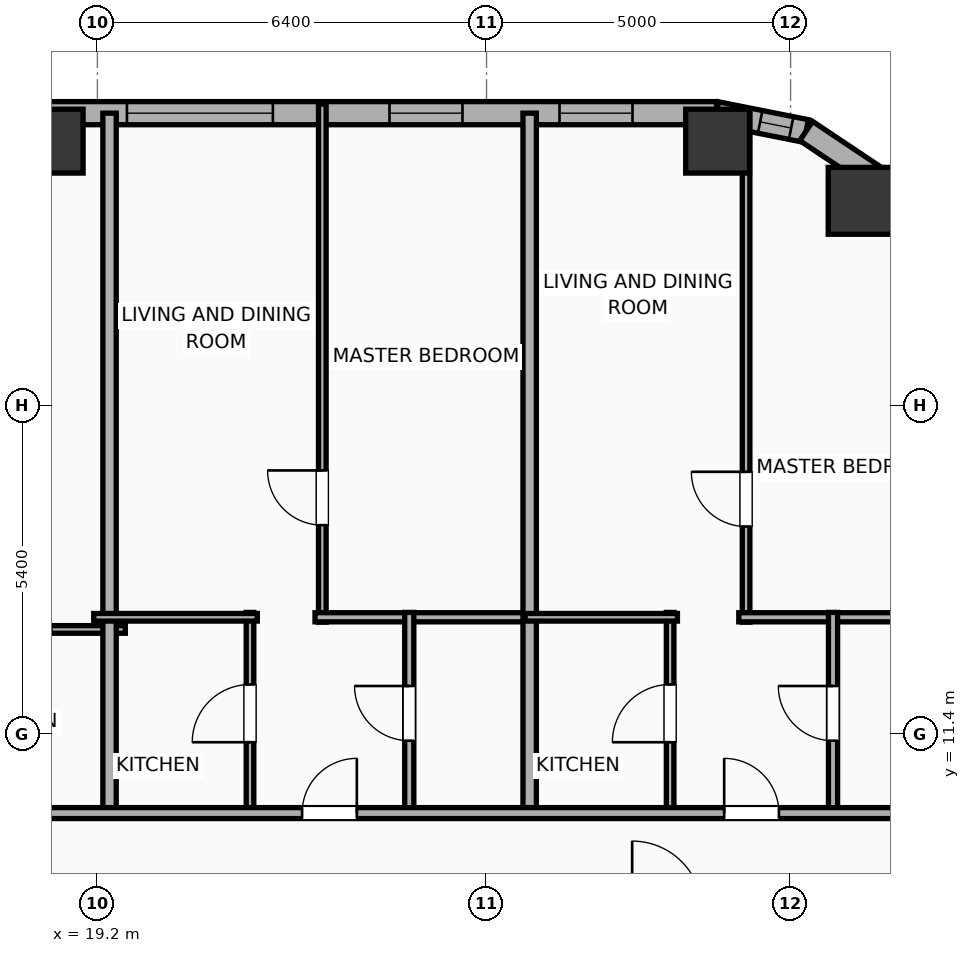
"""IFC4 building model, lengths in metres.
Left out: names, types, materials, properties, quantities, classifications, styles, units other than length and angle.
Written with IfcOpenShell. Run it as: python <this file> out.ifc"""

import sys

from ifc_helpers import new_model, si_unit, direction, frame, frame_2d, origin, origin_2d, place, context, subcontext, project, spatial, rectangle, hollow_rectangle, hollow_circle, extrude, element, fill, save


model = new_model("IFC4")
c1 = context("Model", 3, precision=1e-05, world=origin(), true_north=direction((0.0, 1.0)))
c2 = subcontext(c1, "Body", "Model", "MODEL_VIEW")
j1 = project(units=[si_unit("LENGTHUNIT", "METRE"), si_unit("PLANEANGLEUNIT", "RADIAN")], contexts=[c1])
p1 = place(None, origin())
s1 = spatial("IfcSite", under=j1, at=p1, CompositionType="ELEMENT")
p2 = place(p1, origin())
s2 = spatial("IfcBuilding", under=s1, at=p2, CompositionType="ELEMENT")
p3 = place(p2, frame((0.0, 0.0, 105.3)))
s3 = spatial("IfcBuildingStorey", under=s2, at=p3, CompositionType="ELEMENT", Elevation=105.3)
p4 = place(p3, frame((31.769, 20.169, 0.0), z_axis=(0.0, 0.0, 1.0), x_axis=(1.0, 0.0, 0.0)))
e1 = element("IfcColumn", 1, at=p4, inside=s3, PredefinedType="COLUMN", context=c2, shape_type="SweptSolid", body=[
    extrude(hollow_circle(Radius=0.55, WallThickness=0.036, at=origin_2d()), origin(), (0.0, 0.0, 1.0), 3.9),
])
for number, where, z_axis, x_axis in (
    (2, (29.4, 21.15, 0.0), (0.0, 0.0, 1.0), (1.0, 0.0, 0.0)),
    (3, (18.44, 21.15, 0.0), (0.0, 0.0, 1.0), (1.0, 0.0, 0.0)),
):
    element("IfcColumn", number, at=place(p3, frame(where, z_axis=z_axis, x_axis=x_axis)), inside=s3, PredefinedType="COLUMN", context=c2, shape_type="SweptSolid", body=[
        extrude(hollow_rectangle(XDim=1.05, YDim=1.05, WallThickness=0.036, at=origin_2d()), origin(), (0.0, 0.0, 1.0), 3.9),
    ])
p5 = place(p3, frame((-25.381, 21.61, 0.0), z_axis=(0.0, 0.0, 1.0), x_axis=(1.0, 0.0, 0.0)))
e4 = element("IfcWall", 4, at=p5, inside=s3, PredefinedType="ELEMENTEDWALL", context=c2, shape_type="SweptSolid", body=[
    extrude(rectangle(XDim=54.763, YDim=0.38, at=frame_2d((27.381, 0.0))), origin(), (0.0, 0.0, 1.0), 3.65),
])
p6 = place(p5, frame((45.067, 0.0, 0.75)))
e5 = element("IfcOpeningElement", 5, at=p6, cuts=e4, PredefinedType="OPENING", context=c2, shape_type="SweptSolid", body=[
    extrude(rectangle(XDim=2.4, YDim=2.1, at=frame_2d((1.2, 1.05))), frame((0.0, 0.2, 0.0), z_axis=(0.0, -1.0, 0.0), x_axis=(1.0, 0.0, 0.0)), (0.0, 0.0, 1.0), 0.4),
])
p7 = place(p5, frame((4.076, 0.0, 0.75)))
e6 = element("IfcOpeningElement", 6, at=p7, cuts=e4, PredefinedType="OPENING", context=c2, shape_type="SweptSolid", body=[
    extrude(rectangle(XDim=1.2, YDim=2.05, at=frame_2d((0.6, 1.025))), frame((0.0, 0.2, 0.0), z_axis=(0.0, -1.0, 0.0), x_axis=(1.0, 0.0, 0.0)), (0.0, 0.0, 1.0), 0.4),
])
p8 = place(p5, frame((9.395, 0.0, 0.75)))
e7 = element("IfcOpeningElement", 7, at=p8, cuts=e4, PredefinedType="OPENING", context=c2, shape_type="SweptSolid", body=[
    extrude(rectangle(XDim=0.85, YDim=2.05, at=frame_2d((0.425, 1.025))), frame((0.0, 0.2, 0.0), z_axis=(0.0, -1.0, 0.0), x_axis=(1.0, 0.0, 0.0)), (0.0, 0.0, 1.0), 0.4),
])
p9 = place(p5, frame((7.205, 0.0, 0.75)))
e8 = element("IfcOpeningElement", 8, at=p9, cuts=e4, PredefinedType="OPENING", context=c2, shape_type="SweptSolid", body=[
    extrude(rectangle(XDim=1.2, YDim=2.05, at=frame_2d((0.6, 1.025))), frame((0.0, 0.2, 0.0), z_axis=(0.0, -1.0, 0.0), x_axis=(1.0, 0.0, 0.0)), (0.0, 0.0, 1.0), 0.4),
])
p10 = place(p5, frame((13.676, 0.0, 0.75)))
e9 = element("IfcOpeningElement", 9, at=p10, cuts=e4, PredefinedType="OPENING", context=c2, shape_type="SweptSolid", body=[
    extrude(rectangle(XDim=1.2, YDim=2.05, at=frame_2d((0.6, 1.025))), frame((0.0, 0.2, 0.0), z_axis=(0.0, -1.0, 0.0), x_axis=(1.0, 0.0, 0.0)), (0.0, 0.0, 1.0), 0.4),
])
p11 = place(p5, frame((17.136, 0.0, 0.75)))
e10 = element("IfcOpeningElement", 10, at=p11, cuts=e4, PredefinedType="OPENING", context=c2, shape_type="SweptSolid", body=[
    extrude(rectangle(XDim=1.2, YDim=2.05, at=frame_2d((0.6, 1.025))), frame((0.0, 0.2, 0.0), z_axis=(0.0, -1.0, 0.0), x_axis=(1.0, 0.0, 0.0)), (0.0, 0.0, 1.0), 0.4),
])
p12 = place(p5, frame((22.656, 0.0, 0.75)))
e11 = element("IfcOpeningElement", 11, at=p12, cuts=e4, PredefinedType="OPENING", context=c2, shape_type="SweptSolid", body=[
    extrude(rectangle(XDim=1.2, YDim=2.05, at=frame_2d((0.6, 1.025))), frame((0.0, 0.2, 0.0), z_axis=(0.0, -1.0, 0.0), x_axis=(1.0, 0.0, 0.0)), (0.0, 0.0, 1.0), 0.4),
])
p13 = place(p5, frame((29.443, 0.0, 0.75)))
e12 = element("IfcOpeningElement", 12, at=p13, cuts=e4, PredefinedType="OPENING", context=c2, shape_type="SweptSolid", body=[
    extrude(rectangle(XDim=1.2, YDim=2.05, at=frame_2d((0.6, 1.025))), frame((0.0, 0.2, 0.0), z_axis=(0.0, -1.0, 0.0), x_axis=(1.0, 0.0, 0.0)), (0.0, 0.0, 1.0), 0.4),
])
p14 = place(p5, frame((26.348, 0.0, 0.75)))
e13 = element("IfcOpeningElement", 13, at=p14, cuts=e4, PredefinedType="OPENING", context=c2, shape_type="SweptSolid", body=[
    extrude(rectangle(XDim=1.2, YDim=2.05, at=frame_2d((0.6, 1.025))), frame((0.0, 0.2, 0.0), z_axis=(0.0, -1.0, 0.0), x_axis=(1.0, 0.0, 0.0)), (0.0, 0.0, 1.0), 0.4),
])
p15 = place(p5, frame((33.596, 0.0, 0.75)))
e14 = element("IfcOpeningElement", 14, at=p15, cuts=e4, PredefinedType="OPENING", context=c2, shape_type="SweptSolid", body=[
    extrude(rectangle(XDim=1.2, YDim=2.05, at=frame_2d((0.6, 1.025))), frame((0.0, 0.2, 0.0), z_axis=(0.0, -1.0, 0.0), x_axis=(1.0, 0.0, 0.0)), (0.0, 0.0, 1.0), 0.4),
])
p16 = place(p5, frame((36.014, 0.0, 0.75)))
e15 = element("IfcOpeningElement", 15, at=p16, cuts=e4, PredefinedType="OPENING", context=c2, shape_type="SweptSolid", body=[
    extrude(rectangle(XDim=1.2, YDim=2.05, at=frame_2d((0.6, 1.025))), frame((0.0, 0.2, 0.0), z_axis=(0.0, -1.0, 0.0), x_axis=(1.0, 0.0, 0.0)), (0.0, 0.0, 1.0), 0.4),
])
p17 = place(p5, frame((40.814, 0.0, 0.75)))
e16 = element("IfcOpeningElement", 16, at=p17, cuts=e4, PredefinedType="OPENING", context=c2, shape_type="SweptSolid", body=[
    extrude(rectangle(XDim=1.2, YDim=2.05, at=frame_2d((0.6, 1.025))), frame((0.0, 0.2, 0.0), z_axis=(0.0, -1.0, 0.0), x_axis=(1.0, 0.0, 0.0)), (0.0, 0.0, 1.0), 0.4),
])
p18 = place(p5, frame((49.385, 0.0, 0.75)))
e17 = element("IfcOpeningElement", 17, at=p18, cuts=e4, PredefinedType="OPENING", context=c2, shape_type="SweptSolid", body=[
    extrude(rectangle(XDim=1.2, YDim=2.05, at=frame_2d((0.6, 1.025))), frame((0.0, 0.2, 0.0), z_axis=(0.0, -1.0, 0.0), x_axis=(1.0, 0.0, 0.0)), (0.0, 0.0, 1.0), 0.4),
])
p19 = place(p5, frame((52.181, 0.0, 0.75)))
e18 = element("IfcOpeningElement", 18, at=p19, cuts=e4, PredefinedType="OPENING", context=c2, shape_type="SweptSolid", body=[
    extrude(rectangle(XDim=1.2, YDim=2.05, at=frame_2d((0.6, 1.025))), frame((0.0, 0.2, 0.0), z_axis=(0.0, -1.0, 0.0), x_axis=(1.0, 0.0, 0.0)), (0.0, 0.0, 1.0), 0.4),
])
p20 = place(p3, frame((29.381, 21.61, 0.0), z_axis=(0.0, 0.0, 1.0), x_axis=(0.980755066645, -0.195242155415, 0.0)))
e19 = element("IfcWall", 19, at=p20, inside=s3, PredefinedType="ELEMENTEDWALL", context=c2, shape_type="SweptSolid", body=[
    extrude(rectangle(XDim=1.504, YDim=0.38, at=frame_2d((0.752, 0.0))), origin(), (0.0, 0.0, 1.0), 3.65),
])
p21 = place(p20, frame((0.732, 0.0, 0.75)))
e20 = element("IfcOpeningElement", 20, at=p21, cuts=e19, PredefinedType="OPENING", context=c2, shape_type="SweptSolid", body=[
    extrude(rectangle(XDim=0.52, YDim=2.05, at=frame_2d((0.26, 1.025))), frame((0.0, 0.2, 0.0), z_axis=(0.0, -1.0, 0.0), x_axis=(1.0, 0.0, 0.0)), (0.0, 0.0, 1.0), 0.4),
])
p22 = place(p3, frame((30.857, 21.316, 0.0), z_axis=(0.0, 0.0, 1.0), x_axis=(0.831468045563, -0.555572577804, 0.0)))
e21 = element("IfcWall", 21, at=p22, inside=s3, PredefinedType="ELEMENTEDWALL", context=c2, shape_type="SweptSolid", body=[
    extrude(rectangle(XDim=1.485, YDim=0.38, at=frame_2d((0.742, 0.0))), origin(), (0.0, 0.0, 1.0), 3.65),
])
p23 = place(p3, frame((32.091, 20.491, 0.0), z_axis=(0.0, 0.0, 1.0), x_axis=(0.555610286119, -0.831442848281, 0.0)))
e22 = element("IfcWall", 22, at=p23, inside=s3, PredefinedType="ELEMENTEDWALL", context=c2, shape_type="SweptSolid", body=[
    extrude(rectangle(XDim=1.485, YDim=0.38, at=frame_2d((0.743, 0.0))), origin(), (0.0, 0.0, 1.0), 3.65),
])
p24 = place(p3, frame((16.277, 13.12, 0.0), z_axis=(0.0, 0.0, 1.0), x_axis=(1.0, 0.0, 0.0)))
e23 = element("IfcWall", 23, at=p24, inside=s3, PredefinedType="PARTITIONING", context=c2, shape_type="SweptSolid", body=[
    extrude(rectangle(XDim=3.383, YDim=0.125, at=frame_2d((1.691, 0.0))), origin(), (0.0, 0.0, 1.0), 3.65),
])
p25 = place(p24, frame((1.217, 0.0, 0.0)))
e24 = element("IfcOpeningElement", 24, at=p25, cuts=e23, PredefinedType="OPENING", context=c2, shape_type="SweptSolid", body=[
    extrude(rectangle(XDim=0.95, YDim=2.05, at=frame_2d((0.475, 1.025))), frame((0.0, 0.073, 0.0), z_axis=(0.0, -1.0, 0.0), x_axis=(1.0, 0.0, 0.0)), (0.0, 0.0, 1.0), 0.145),
])
p26 = place(p3, frame((19.4, 10.02, 0.0), z_axis=(0.0, 0.0, 1.0), x_axis=(0.0, 1.0, 0.0)))
e25 = element("IfcWall", 25, at=p26, inside=s3, PredefinedType="PARTITIONING", context=c2, shape_type="SweptSolid", body=[
    extrude(rectangle(XDim=11.59, YDim=0.22, at=frame_2d((5.795, 0.0))), origin(), (0.0, 0.0, 1.0), 3.65),
])
p27 = place(p3, frame((22.899, 13.24, 0.0), z_axis=(0.0, 0.0, 1.0), x_axis=(0.0, 1.0, 0.0)))
e26 = element("IfcWall", 26, at=p27, inside=s3, PredefinedType="PARTITIONING", context=c2, shape_type="SweptSolid", body=[
    extrude(rectangle(XDim=8.52, YDim=0.125, at=frame_2d((4.26, 0.0))), origin(), (0.0, 0.0, 1.0), 3.65),
])
p28 = place(p27, frame((1.595, 0.0, 0.0)))
e27 = element("IfcOpeningElement", 27, at=p28, cuts=e26, PredefinedType="OPENING", context=c2, shape_type="SweptSolid", body=[
    extrude(rectangle(XDim=0.9, YDim=2.05, at=frame_2d((0.45, 1.025))), frame((0.0, 0.073, 0.0), z_axis=(0.0, -1.0, 0.0), x_axis=(1.0, 0.0, 0.0)), (0.0, 0.0, 1.0), 0.145),
])
p29 = place(p3, frame((22.779, 13.32, 0.0), z_axis=(0.0, 0.0, 1.0), x_axis=(1.0, 0.0, 0.0)))
e28 = element("IfcWall", 28, at=p29, inside=s3, PredefinedType="PLUMBINGWALL", context=c2, shape_type="SweptSolid", body=[
    extrude(rectangle(XDim=3.605, YDim=0.15, at=frame_2d((1.802, 0.0))), origin(), (0.0, 0.0, 1.0), 3.65),
])
p30 = place(p3, frame((21.71, 10.08, 0.0), z_axis=(0.0, 0.0, 1.0), x_axis=(0.0, 1.0, 0.0)))
e29 = element("IfcWall", 29, at=p30, inside=s3, PredefinedType="PARTITIONING", context=c2, shape_type="SweptSolid", body=[
    extrude(rectangle(XDim=3.32, YDim=0.125, at=frame_2d((1.66, 0.0))), origin(), (0.0, 0.0, 1.0), 3.65),
])
p31 = place(p30, frame((1.185, 0.0, 0.0)))
e30 = element("IfcOpeningElement", 30, at=p31, cuts=e29, PredefinedType="OPENING", context=c2, shape_type="SweptSolid", body=[
    extrude(rectangle(XDim=0.95, YDim=2.05, at=frame_2d((0.475, 1.025))), frame((0.0, 0.073, 0.0), z_axis=(0.0, -1.0, 0.0), x_axis=(1.0, 0.0, 0.0)), (0.0, 0.0, 1.0), 0.145),
])
p32 = place(p3, frame((19.14, 13.32, 0.0), z_axis=(0.0, 0.0, 1.0), x_axis=(1.0, 0.0, 0.0)))
e31 = element("IfcWall", 31, at=p32, inside=s3, PredefinedType="PARTITIONING", context=c2, shape_type="SweptSolid", body=[
    extrude(rectangle(XDim=2.69, YDim=0.125, at=frame_2d((1.345, 0.0))), origin(), (0.0, 0.0, 1.0), 3.65),
])
p33 = place(p3, frame((24.329, 10.08, 0.0), z_axis=(0.0, 0.0, 1.0), x_axis=(0.0, 1.0, 0.0)))
e32 = element("IfcWall", 32, at=p33, inside=s3, PredefinedType="PLUMBINGWALL", context=c2, shape_type="SweptSolid", body=[
    extrude(rectangle(XDim=3.32, YDim=0.15, at=frame_2d((1.66, 0.0))), origin(), (0.0, 0.0, 1.0), 3.65),
])
p34 = place(p33, frame((1.21, 0.0, 0.0)))
e33 = element("IfcOpeningElement", 33, at=p34, cuts=e32, PredefinedType="OPENING", context=c2, shape_type="SweptSolid", body=[
    extrude(rectangle(XDim=0.9, YDim=2.05, at=frame_2d((0.45, 1.025))), frame((0.0, 0.085, 0.0), z_axis=(0.0, -1.0, 0.0), x_axis=(1.0, 0.0, 0.0)), (0.0, 0.0, 1.0), 0.17),
])
p35 = place(p3, frame((26.309, 10.02, 0.0), z_axis=(0.0, 0.0, 1.0), x_axis=(0.0, 1.0, 0.0)))
e34 = element("IfcWall", 34, at=p35, inside=s3, PredefinedType="PARTITIONING", context=c2, shape_type="SweptSolid", body=[
    extrude(rectangle(XDim=11.59, YDim=0.22, at=frame_2d((5.795, 0.0))), origin(), (0.0, 0.0, 1.0), 3.65),
])
p36 = place(p3, frame((29.868, 13.24, 0.0), z_axis=(0.0, 0.0, 1.0), x_axis=(0.0, 1.0, 0.0)))
e35 = element("IfcWall", 35, at=p36, inside=s3, PredefinedType="PARTITIONING", context=c2, shape_type="SweptSolid", body=[
    extrude(rectangle(XDim=8.426, YDim=0.125, at=frame_2d((4.213, 0.0))), origin(), (0.0, 0.0, 1.0), 3.65),
])
p37 = place(p36, frame((1.572, 0.0, 0.0)))
e36 = element("IfcOpeningElement", 36, at=p37, cuts=e35, PredefinedType="OPENING", context=c2, shape_type="SweptSolid", body=[
    extrude(rectangle(XDim=0.9, YDim=2.05, at=frame_2d((0.45, 1.025))), frame((0.0, 0.073, 0.0), z_axis=(0.0, -1.0, 0.0), x_axis=(1.0, 0.0, 0.0)), (0.0, 0.0, 1.0), 0.145),
])
p38 = place(p3, frame((29.748, 13.32, 0.0), z_axis=(0.0, 0.0, 1.0), x_axis=(1.0, 0.0, 0.0)))
e37 = element("IfcWall", 37, at=p38, inside=s3, PredefinedType="PLUMBINGWALL", context=c2, shape_type="SweptSolid", body=[
    extrude(rectangle(XDim=3.612, YDim=0.15, at=frame_2d((1.806, 0.0))), origin(), (0.0, 0.0, 1.0), 3.65),
])
p39 = place(p3, frame((28.619, 10.08, 0.0), z_axis=(0.0, 0.0, 1.0), x_axis=(0.0, 1.0, 0.0)))
e38 = element("IfcWall", 38, at=p39, inside=s3, PredefinedType="PARTITIONING", context=c2, shape_type="SweptSolid", body=[
    extrude(rectangle(XDim=3.32, YDim=0.125, at=frame_2d((1.66, 0.0))), origin(), (0.0, 0.0, 1.0), 3.65),
])
p40 = place(p39, frame((1.185, 0.0, 0.0)))
e39 = element("IfcOpeningElement", 39, at=p40, cuts=e38, PredefinedType="OPENING", context=c2, shape_type="SweptSolid", body=[
    extrude(rectangle(XDim=0.95, YDim=2.05, at=frame_2d((0.475, 1.025))), frame((0.0, 0.073, 0.0), z_axis=(0.0, -1.0, 0.0), x_axis=(1.0, 0.0, 0.0)), (0.0, 0.0, 1.0), 0.145),
])
p41 = place(p3, frame((26.234, 13.32, 0.0), z_axis=(0.0, 0.0, 1.0), x_axis=(1.0, 0.0, 0.0)))
e40 = element("IfcWall", 40, at=p41, inside=s3, PredefinedType="PARTITIONING", context=c2, shape_type="SweptSolid", body=[
    extrude(rectangle(XDim=2.505, YDim=0.125, at=frame_2d((1.252, 0.0))), origin(), (0.0, 0.0, 1.0), 3.65),
])
p42 = place(p3, frame((31.298, 10.08, 0.0), z_axis=(0.0, 0.0, 1.0), x_axis=(0.0, 1.0, 0.0)))
e41 = element("IfcWall", 41, at=p42, inside=s3, PredefinedType="PLUMBINGWALL", context=c2, shape_type="SweptSolid", body=[
    extrude(rectangle(XDim=3.32, YDim=0.15, at=frame_2d((1.66, 0.0))), origin(), (0.0, 0.0, 1.0), 3.65),
])
p43 = place(p42, frame((1.21, 0.0, 0.0)))
e42 = element("IfcOpeningElement", 42, at=p43, cuts=e41, PredefinedType="OPENING", context=c2, shape_type="SweptSolid", body=[
    extrude(rectangle(XDim=0.9, YDim=2.05, at=frame_2d((0.45, 1.025))), frame((0.0, 0.085, 0.0), z_axis=(0.0, -1.0, 0.0), x_axis=(1.0, 0.0, 0.0)), (0.0, 0.0, 1.0), 0.17),
])
p44 = place(p3, frame((-29.21, 10.1, 0.0), z_axis=(0.0, 0.0, 1.0), x_axis=(1.0, 0.0, 0.0)))
e43 = element("IfcWall", 43, at=p44, inside=s3, PredefinedType="PARTITIONING", context=c2, shape_type="SweptSolid", body=[
    extrude(rectangle(XDim=62.42, YDim=0.18, at=frame_2d((31.21, 0.0))), origin(), (0.0, 0.0, 1.0), 3.65),
])
p45 = place(p44, frame((4.906, 0.0, 0.0)))
e44 = element("IfcOpeningElement", 44, at=p45, cuts=e43, PredefinedType="OPENING", context=c2, shape_type="SweptSolid", body=[
    extrude(rectangle(XDim=1.15, YDim=2.05, at=frame_2d((0.575, 1.025))), frame((0.0, 0.1, 0.0), z_axis=(0.0, -1.0, 0.0), x_axis=(1.0, 0.0, 0.0)), (0.0, 0.0, 1.0), 0.2),
])
p46 = place(p44, frame((14.812, 0.0, 0.0)))
e45 = element("IfcOpeningElement", 45, at=p46, cuts=e43, PredefinedType="OPENING", context=c2, shape_type="SweptSolid", body=[
    extrude(rectangle(XDim=1.15, YDim=2.05, at=frame_2d((0.575, 1.025))), frame((0.0, 0.1, 0.0), z_axis=(0.0, -1.0, 0.0), x_axis=(1.0, 0.0, 0.0)), (0.0, 0.0, 1.0), 0.2),
])
p47 = place(p44, frame((24.406, 0.0, 0.0)))
e46 = element("IfcOpeningElement", 46, at=p47, cuts=e43, PredefinedType="OPENING", context=c2, shape_type="SweptSolid", body=[
    extrude(rectangle(XDim=1.15, YDim=2.05, at=frame_2d((0.575, 1.025))), frame((0.0, 0.1, 0.0), z_axis=(0.0, -1.0, 0.0), x_axis=(1.0, 0.0, 0.0)), (0.0, 0.0, 1.0), 0.2),
])
p48 = place(p44, frame((33.981, 0.0, 0.0)))
e47 = element("IfcOpeningElement", 47, at=p48, cuts=e43, PredefinedType="OPENING", context=c2, shape_type="SweptSolid", body=[
    extrude(rectangle(XDim=1.15, YDim=2.05, at=frame_2d((0.575, 1.025))), frame((0.0, 0.1, 0.0), z_axis=(0.0, -1.0, 0.0), x_axis=(1.0, 0.0, 0.0)), (0.0, 0.0, 1.0), 0.2),
])
p49 = place(p44, frame((43.138, 0.0, 0.0)))
e48 = element("IfcOpeningElement", 48, at=p49, cuts=e43, PredefinedType="OPENING", context=c2, shape_type="SweptSolid", body=[
    extrude(rectangle(XDim=1.15, YDim=2.05, at=frame_2d((0.575, 1.025))), frame((0.0, 0.1, 0.0), z_axis=(0.0, -1.0, 0.0), x_axis=(1.0, 0.0, 0.0)), (0.0, 0.0, 1.0), 0.2),
])
p50 = place(p44, frame((51.777, 0.0, 0.0)))
e49 = element("IfcOpeningElement", 49, at=p50, cuts=e43, PredefinedType="OPENING", context=c2, shape_type="SweptSolid", body=[
    extrude(rectangle(XDim=0.9, YDim=2.05, at=frame_2d((0.45, 1.025))), frame((0.0, 0.1, 0.0), z_axis=(0.0, -1.0, 0.0), x_axis=(1.0, 0.0, 0.0)), (0.0, 0.0, 1.0), 0.2),
])
p51 = place(p44, frame((58.718, 0.0, 0.0)))
e50 = element("IfcOpeningElement", 50, at=p51, cuts=e43, PredefinedType="OPENING", context=c2, shape_type="SweptSolid", body=[
    extrude(rectangle(XDim=0.9, YDim=2.05, at=frame_2d((0.45, 1.025))), frame((0.0, 0.1, 0.0), z_axis=(0.0, -1.0, 0.0), x_axis=(1.0, 0.0, 0.0)), (0.0, 0.0, 1.0), 0.2),
])
p52 = place(p6, origin())
e51 = element("IfcWindow", 51, at=p52, inside=s3, PartitioningType="SINGLE_PANEL", PredefinedType="WINDOW", context=c2, shape_type="SweptSolid", body=[
    extrude(rectangle(XDim=2.4, YDim=2.1, at=frame_2d((1.2, 1.05))), frame((0.0, 0.03, 0.0), z_axis=(0.0, -1.0, 0.0), x_axis=(1.0, 0.0, 0.0)), (0.0, 0.0, 1.0), 0.06),
])
fill(e5, e51)
p53 = place(p18, origin())
e52 = element("IfcWindow", 52, at=p53, inside=s3, PartitioningType="SINGLE_PANEL", PredefinedType="WINDOW", context=c2, shape_type="SweptSolid", body=[
    extrude(rectangle(XDim=1.2, YDim=2.05, at=frame_2d((0.6, 1.025))), frame((0.0, 0.03, 0.0), z_axis=(0.0, -1.0, 0.0), x_axis=(1.0, 0.0, 0.0)), (0.0, 0.0, 1.0), 0.06),
])
fill(e17, e52)
p54 = place(p19, origin())
e53 = element("IfcWindow", 53, at=p54, inside=s3, PartitioningType="SINGLE_PANEL", PredefinedType="WINDOW", context=c2, shape_type="SweptSolid", body=[
    extrude(rectangle(XDim=1.2, YDim=2.05, at=frame_2d((0.6, 1.025))), frame((0.0, 0.03, 0.0), z_axis=(0.0, -1.0, 0.0), x_axis=(1.0, 0.0, 0.0)), (0.0, 0.0, 1.0), 0.06),
])
fill(e18, e53)
p55 = place(p21, origin())
e54 = element("IfcWindow", 54, at=p55, inside=s3, PartitioningType="SINGLE_PANEL", PredefinedType="WINDOW", context=c2, shape_type="SweptSolid", body=[
    extrude(rectangle(XDim=0.52, YDim=2.05, at=frame_2d((0.26, 1.025))), frame((0.0, 0.03, 0.0), z_axis=(0.0, -1.0, 0.0), x_axis=(1.0, 0.0, 0.0)), (0.0, 0.0, 1.0), 0.06),
])
fill(e20, e54)
p56 = place(p28, origin())
e55 = element("IfcDoor", 55, at=p56, inside=s3, OperationType="SINGLE_SWING_RIGHT", PredefinedType="DOOR", context=c2, shape_type="SweptSolid", body=[
    extrude(rectangle(XDim=0.9, YDim=2.05, at=frame_2d((0.45, 1.025))), frame((0.0, 0.025, 0.0), z_axis=(0.0, -1.0, 0.0), x_axis=(1.0, 0.0, 0.0)), (0.0, 0.0, 1.0), 0.05),
])
fill(e27, e55)
p57 = place(p31, origin())
e56 = element("IfcDoor", 56, at=p57, inside=s3, OperationType="SINGLE_SWING_LEFT", PredefinedType="DOOR", context=c2, shape_type="SweptSolid", body=[
    extrude(rectangle(XDim=0.95, YDim=2.05, at=frame_2d((0.475, 1.025))), frame((0.0, 0.025, 0.0), z_axis=(0.0, -1.0, 0.0), x_axis=(1.0, 0.0, 0.0)), (0.0, 0.0, 1.0), 0.05),
])
fill(e30, e56)
p58 = place(p34, origin())
e57 = element("IfcDoor", 57, at=p58, inside=s3, OperationType="SINGLE_SWING_RIGHT", PredefinedType="DOOR", context=c2, shape_type="SweptSolid", body=[
    extrude(rectangle(XDim=0.9, YDim=2.05, at=frame_2d((0.45, 1.025))), frame((0.0, 0.025, 0.0), z_axis=(0.0, -1.0, 0.0), x_axis=(1.0, 0.0, 0.0)), (0.0, 0.0, 1.0), 0.05),
])
fill(e33, e57)
p59 = place(p37, origin())
e58 = element("IfcDoor", 58, at=p59, inside=s3, OperationType="SINGLE_SWING_RIGHT", PredefinedType="DOOR", context=c2, shape_type="SweptSolid", body=[
    extrude(rectangle(XDim=0.9, YDim=2.05, at=frame_2d((0.45, 1.025))), frame((0.0, 0.025, 0.0), z_axis=(0.0, -1.0, 0.0), x_axis=(1.0, 0.0, 0.0)), (0.0, 0.0, 1.0), 0.05),
])
fill(e36, e58)
p60 = place(p40, origin())
e59 = element("IfcDoor", 59, at=p60, inside=s3, OperationType="SINGLE_SWING_LEFT", PredefinedType="DOOR", context=c2, shape_type="SweptSolid", body=[
    extrude(rectangle(XDim=0.95, YDim=2.05, at=frame_2d((0.475, 1.025))), frame((0.0, 0.025, 0.0), z_axis=(0.0, -1.0, 0.0), x_axis=(1.0, 0.0, 0.0)), (0.0, 0.0, 1.0), 0.05),
])
fill(e39, e59)
p61 = place(p43, origin())
e60 = element("IfcDoor", 60, at=p61, inside=s3, OperationType="SINGLE_SWING_RIGHT", PredefinedType="DOOR", context=c2, shape_type="SweptSolid", body=[
    extrude(rectangle(XDim=0.9, YDim=2.05, at=frame_2d((0.45, 1.025))), frame((0.0, 0.025, 0.0), z_axis=(0.0, -1.0, 0.0), x_axis=(1.0, 0.0, 0.0)), (0.0, 0.0, 1.0), 0.05),
])
fill(e42, e60)
p62 = place(p50, origin())
e61 = element("IfcDoor", 61, at=p62, inside=s3, OperationType="SINGLE_SWING_RIGHT", PredefinedType="DOOR", context=c2, shape_type="SweptSolid", body=[
    extrude(rectangle(XDim=0.9, YDim=2.05, at=frame_2d((0.45, 1.025))), frame((0.0, 0.025, 0.0), z_axis=(0.0, -1.0, 0.0), x_axis=(1.0, 0.0, 0.0)), (0.0, 0.0, 1.0), 0.05),
])
fill(e49, e61)
p63 = place(p51, origin())
e62 = element("IfcDoor", 62, at=p63, inside=s3, OperationType="SINGLE_SWING_LEFT", PredefinedType="DOOR", context=c2, shape_type="SweptSolid", body=[
    extrude(rectangle(XDim=0.9, YDim=2.05, at=frame_2d((0.45, 1.025))), frame((0.0, 0.025, 0.0), z_axis=(0.0, -1.0, 0.0), x_axis=(1.0, 0.0, 0.0)), (0.0, 0.0, 1.0), 0.05),
])
fill(e50, e62)
save(model, sys.argv[1])
